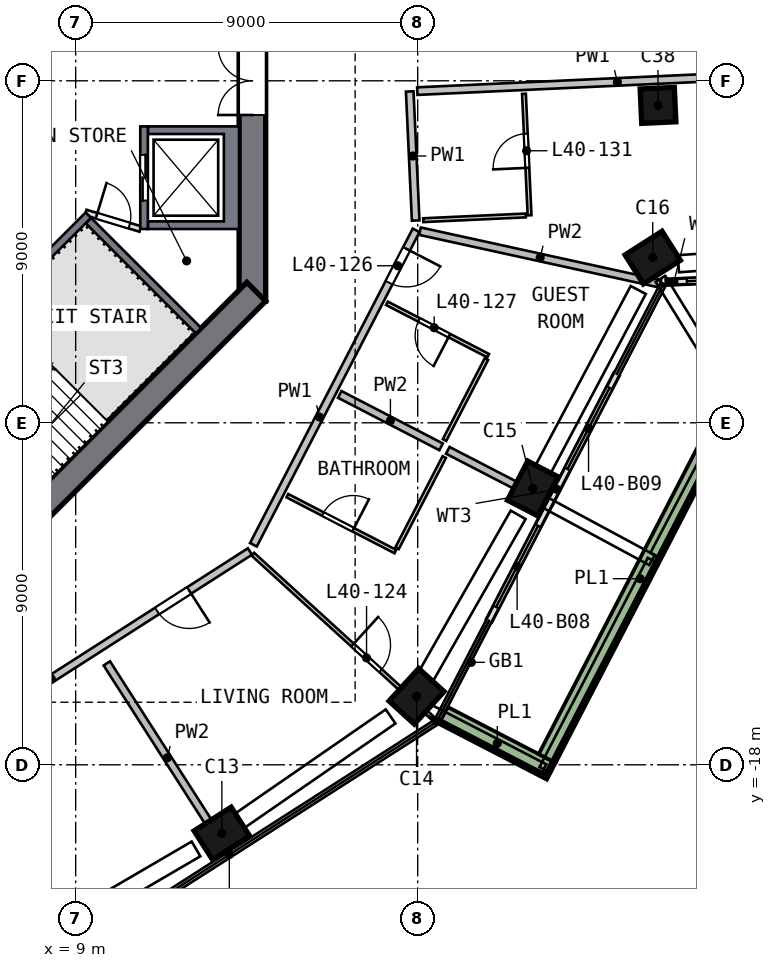
"""IFC4 building model, lengths in metres.
Left out: names, types, materials, properties, quantities, classifications, styles, units other than length and angle.
Written with IfcOpenShell. Run it as: python <this file> out.ifc"""

import sys

from ifc_helpers import new_model, si_unit, direction, frame, frame_2d, origin, origin_2d, place, context, subcontext, project, spatial, polyline, rectangle, outline, extrude, element, fill, save


model = new_model("IFC4")
c1 = context("Model", 3, precision=1e-05, world=origin(), true_north=direction((0.0, 1.0)))
c2 = subcontext(c1, "Body", "Model", "MODEL_VIEW")
j1 = project(units=[si_unit("LENGTHUNIT", "METRE"), si_unit("PLANEANGLEUNIT", "RADIAN")], contexts=[c1])
p1 = place(None, origin())
s1 = spatial("IfcSite", under=j1, at=p1, CompositionType="ELEMENT")
p2 = place(p1, origin())
s2 = spatial("IfcBuilding", under=s1, at=p2, CompositionType="ELEMENT")
p3 = place(p2, frame((0.0, 0.0, 165.5)))
s3 = spatial("IfcBuildingStorey", under=s2, at=p3, CompositionType="ELEMENT", Elevation=165.5)
p4 = place(p3, frame((12.733, -19.88, 0.0), z_axis=(0.094046929, 0.061296279, 0.993678993), x_axis=(0.837046934, 0.535491613, -0.112254901)))
e1 = element("IfcColumn", 1, at=p4, inside=s3, PredefinedType="COLUMN", context=c2, shape_type="SweptSolid", body=[
    extrude(rectangle(XDim=1.15, YDim=0.9, at=origin_2d()), origin(), (0.0, 0.0, 1.0), 3.019),
])
p5 = place(p3, frame((17.877, -16.301, 0.0), z_axis=(0.076717303, 0.08569056, 0.993363772), x_axis=(-0.668853924, -0.734443295, 0.115010764)))
e2 = element("IfcColumn", 2, at=p5, inside=s3, PredefinedType="COLUMN", context=c2, shape_type="SweptSolid", body=[
    extrude(rectangle(XDim=1.15, YDim=0.9, at=origin_2d()), origin(), (0.0, 0.0, 1.0), 3.02),
])
p6 = place(p3, frame((20.967, -10.85, 0.0), z_axis=(0.050783742, 0.100111899, 0.993679334), x_axis=(0.457036789, 0.882336041, -0.112251882)))
e3 = element("IfcColumn", 3, at=p6, inside=s3, PredefinedType="COLUMN", context=c2, shape_type="SweptSolid", body=[
    extrude(rectangle(XDim=1.15, YDim=0.9, at=origin_2d()), origin(), (0.0, 0.0, 1.0), 3.019),
])
p7 = place(p3, frame((24.158, -4.792, 0.0), z_axis=(0.021821591, 0.115007869, 0.99312487), x_axis=(-0.84308303, -0.531783602, 0.080107461)))
e4 = element("IfcColumn", 4, at=p7, inside=s3, PredefinedType="COLUMN", context=c2, shape_type="SweptSolid", body=[
    extrude(rectangle(XDim=1.15, YDim=0.9, at=origin_2d()), origin(), (0.0, 0.0, 1.0), 3.021),
])
p8 = place(p3, frame((24.32, -0.787, 0.0), z_axis=(0.002829176, 0.115672888, 0.993283333), x_axis=(0.998970509, 0.044645345, -0.008044552)))
e5 = element("IfcColumn", 5, at=p8, inside=s3, PredefinedType="COLUMN", context=c2, shape_type="SweptSolid", body=[
    extrude(rectangle(XDim=0.9, YDim=0.9, at=origin_2d()), origin(), (0.0, 0.0, 1.0), 3.02),
])
p9 = place(p3, frame((13.65, -5.799, 0.0), z_axis=(0.0, 0.0, 1.0), x_axis=(0.0, 1.0, 0.0)))
e6 = element("IfcWall", 6, at=p9, inside=s3, PredefinedType="SHEAR", context=c2, shape_type="SweptSolid", body=[
    extrude(rectangle(XDim=11.598, YDim=0.7, at=frame_2d((5.799, 0.0))), origin(), (0.0, 0.0, 1.0), 3.5),
])
p10 = place(p9, frame((4.899, 0.0, 0.0)))
e7 = element("IfcOpeningElement", 7, at=p10, cuts=e6, PredefinedType="OPENING", context=c2, shape_type="SweptSolid", body=[
    extrude(rectangle(XDim=1.8, YDim=2.1, at=frame_2d((0.9, 1.05))), frame((0.0, 0.36, 0.0), z_axis=(0.0, -1.0, 0.0), x_axis=(1.0, 0.0, 0.0)), (0.0, 0.0, 1.0), 0.72),
])
p11 = place(p3, frame((5.552, -13.752, 0.0), z_axis=(0.0, 0.0, 1.0), x_axis=(0.707106781, 0.707106781, 0.0)))
e8 = element("IfcWall", 8, at=p11, inside=s3, PredefinedType="SHEAR", context=c2, shape_type="SweptSolid", body=[
    extrude(rectangle(XDim=11.598, YDim=0.7, at=frame_2d((5.799, 0.0))), origin(), (0.0, 0.0, 1.0), 3.5),
])
p12 = place(p11, frame((2.099, 0.0, 0.0)))
e9 = element("IfcOpeningElement", 9, at=p12, cuts=e8, PredefinedType="OPENING", context=c2, shape_type="SweptSolid", body=[
    extrude(rectangle(XDim=1.2, YDim=2.1, at=frame_2d((0.6, 1.05))), frame((0.0, 0.36, 0.0), z_axis=(0.0, -1.0, 0.0), x_axis=(1.0, 0.0, 0.0)), (0.0, 0.0, 1.0), 0.72),
])
p13 = place(p3, frame((19.881, -14.2, 0.0), z_axis=(0.0, 0.0, 1.0), x_axis=(0.459564354, 0.888144473, 0.0)))
e10 = element("IfcWall", 10, at=p13, inside=s3, PredefinedType="SOLIDWALL", context=c2, shape_type="SweptSolid", body=[
    extrude(rectangle(XDim=3.475, YDim=0.15, at=frame_2d((1.737, 0.0))), origin(), (0.0, 0.0, 1.0), 2.935),
])
p14 = place(p13, frame((0.4, 0.0, 0.0)))
e11 = element("IfcOpeningElement", 11, at=p14, cuts=e10, PredefinedType="OPENING", context=c2, shape_type="SweptSolid", body=[
    extrude(rectangle(XDim=2.4, YDim=2.4, at=frame_2d((1.2, 1.2))), frame((0.0, 0.085, 0.0), z_axis=(0.0, -1.0, 0.0), x_axis=(1.0, 0.0, 0.0)), (0.0, 0.0, 1.0), 0.17),
])
p15 = place(p3, frame((21.478, -11.114, 0.0), z_axis=(0.0, 0.0, 1.0), x_axis=(0.459588339, 0.888132062, 0.0)))
e12 = element("IfcWall", 12, at=p15, inside=s3, PredefinedType="SOLIDWALL", context=c2, shape_type="SweptSolid", body=[
    extrude(rectangle(XDim=3.814, YDim=0.15, at=frame_2d((1.907, 0.0))), origin(), (0.0, 0.0, 1.0), 2.935),
])
p16 = place(p15, frame((1.014, 0.0, 0.0)))
e13 = element("IfcOpeningElement", 13, at=p16, cuts=e12, PredefinedType="OPENING", context=c2, shape_type="SweptSolid", body=[
    extrude(rectangle(XDim=2.4, YDim=2.4, at=frame_2d((1.2, 1.2))), frame((0.0, 0.085, 0.0), z_axis=(0.0, -1.0, 0.0), x_axis=(1.0, 0.0, 0.0)), (0.0, 0.0, 1.0), 0.17),
])
p17 = place(p3, frame((24.598, -5.298, 0.0), z_axis=(0.0, 0.0, 1.0), x_axis=(0.9989369, 0.04609849, 0.0)))
e14 = element("IfcWall", 14, at=p17, inside=s3, PredefinedType="SOLIDWALL", context=c2, shape_type="SweptSolid", body=[
    extrude(rectangle(XDim=2.388, YDim=0.15, at=frame_2d((1.194, 0.0))), origin(), (0.0, 0.0, 1.0), 2.935),
])
p18 = place(p17, frame((0.489, 0.0, 0.0)))
e15 = element("IfcOpeningElement", 15, at=p18, cuts=e14, PredefinedType="OPENING", context=c2, shape_type="SweptSolid", body=[
    extrude(rectangle(XDim=1.5, YDim=2.4, at=frame_2d((0.75, 1.2))), frame((0.0, 0.085, 0.0), z_axis=(0.0, -1.0, 0.0), x_axis=(1.0, 0.0, 0.0)), (0.0, 0.0, 1.0), 0.17),
])
p19 = place(p3, frame((18.673, -16.7, 0.0), z_axis=(0.0, 0.0, 1.0), x_axis=(0.888128492, -0.459595237, 0.0)))
e16 = element("IfcWall", 16, at=p19, inside=s3, PredefinedType="SOLIDWALL", context=c2, shape_type="SweptSolid", body=[
    extrude(rectangle(XDim=3.199, YDim=0.5, at=frame_2d((1.6, 0.0))), origin(), (0.0, 0.0, 1.0), 0.7),
])
p20 = place(p3, frame((21.407, -17.833, 0.0), z_axis=(0.0, 0.0, 1.0), x_axis=(0.459583147, 0.888134748, 0.0)))
e17 = element("IfcWall", 17, at=p20, inside=s3, PredefinedType="SOLIDWALL", context=c2, shape_type="SweptSolid", body=[
    extrude(rectangle(XDim=10.653, YDim=0.5, at=frame_2d((5.326, 0.0))), origin(), (0.0, 0.0, 1.0), 0.7),
])
p21 = place(p3, origin())
e18 = element("IfcWall", 18, at=p21, inside=s3, PredefinedType="SOLIDWALL", context=c2, shape_type="SweptSolid", body=[
    extrude(outline(polyline([(13.3, -3.9), (10.9, -3.9), (10.9, -3.7), (12.9, -3.7), (12.9, -1.4), (10.9, -1.4), (10.9, -1.2), (13.3, -1.2), (13.3, -3.9)])), origin(), (0.0, 0.0, 1.0), 3.0),
])
p22 = place(p3, frame((10.8, -1.2, 0.0), z_axis=(0.0, 0.0, 1.0), x_axis=(0.0, -1.0, 0.0)))
e19 = element("IfcWall", 19, at=p22, inside=s3, PredefinedType="SOLIDWALL", context=c2, shape_type="SweptSolid", body=[
    extrude(rectangle(XDim=2.7, YDim=0.2, at=frame_2d((1.35, 0.0))), origin(), (0.0, 0.0, 1.0), 3.0),
])
p23 = place(p22, frame((0.75, 0.0, 0.0)))
e20 = element("IfcOpeningElement", 20, at=p23, cuts=e19, PredefinedType="OPENING", context=c2, shape_type="SweptSolid", body=[
    extrude(rectangle(XDim=1.2, YDim=2.1, at=frame_2d((0.6, 1.05))), frame((0.0, 0.11, 0.0), z_axis=(0.0, -1.0, 0.0), x_axis=(1.0, 0.0, 0.0)), (0.0, 0.0, 1.0), 0.22),
])
p24 = place(p3, frame((9.334, -3.535, 0.0), z_axis=(0.0, 0.0, 1.0), x_axis=(-0.707106781, -0.707106781, 0.0)))
e21 = element("IfcWall", 21, at=p24, inside=s3, PredefinedType="SOLIDWALL", context=c2, shape_type="SweptSolid", body=[
    extrude(rectangle(XDim=8.2, YDim=0.2, at=frame_2d((4.1, 0.0))), origin(), (0.0, 0.0, 1.0), 3.0),
])
p25 = place(p24, frame((6.6, 0.0, 0.0)))
e22 = element("IfcOpeningElement", 22, at=p25, cuts=e21, PredefinedType="OPENING", context=c2, shape_type="SweptSolid", body=[
    extrude(rectangle(XDim=1.2, YDim=2.1, at=frame_2d((0.6, 1.05))), frame((0.0, 0.11, 0.0), z_axis=(0.0, -1.0, 0.0), x_axis=(1.0, 0.0, 0.0)), (0.0, 0.0, 1.0), 0.22),
])
p26 = place(p3, frame((9.334, -3.677, 0.0), z_axis=(0.0, 0.0, 1.0), x_axis=(0.707106781, -0.707106781, 0.0)))
e23 = element("IfcWall", 23, at=p26, inside=s3, PredefinedType="SOLIDWALL", context=c2, shape_type="SweptSolid", body=[
    extrude(rectangle(XDim=4.1, YDim=0.2, at=frame_2d((2.05, 0.0))), origin(), (0.0, 0.0, 1.0), 3.0),
])
p27 = place(p3, frame((9.263, -3.465, 0.0), z_axis=(0.0, 0.0, 1.0), x_axis=(0.957084567, -0.289808785, 0.0)))
e24 = element("IfcWall", 24, at=p27, inside=s3, PredefinedType="PARTITIONING", context=c2, shape_type="SweptSolid", body=[
    extrude(rectangle(XDim=1.501, YDim=0.15, at=frame_2d((0.75, 0.0))), origin(), (0.0, 0.0, 1.0), 3.0),
])
p28 = place(p27, frame((0.301, 0.0, 0.0)))
e25 = element("IfcOpeningElement", 25, at=p28, cuts=e24, PredefinedType="OPENING", context=c2, shape_type="SweptSolid", body=[
    extrude(rectangle(XDim=0.9, YDim=2.1, at=frame_2d((0.45, 1.05))), frame((0.0, 0.085, 0.0), z_axis=(0.0, -1.0, 0.0), x_axis=(1.0, 0.0, 0.0)), (0.0, 0.0, 1.0), 0.17),
])
p29 = place(p3, frame((13.585, -12.387, 0.0), z_axis=(0.0, 0.0, 1.0), x_axis=(-0.842082403, -0.539348892, 0.0)))
e26 = element("IfcWall", 26, at=p29, inside=s3, PredefinedType="SOLIDWALL", context=c2, shape_type="SweptSolid", body=[
    extrude(rectangle(XDim=9.316, YDim=0.2, at=frame_2d((4.658, 0.0))), origin(), (0.0, 0.0, 1.0), 3.0),
])
p30 = place(p29, frame((1.9, 0.0, 0.0)))
e27 = element("IfcOpeningElement", 27, at=p30, cuts=e26, PredefinedType="OPENING", context=c2, shape_type="SweptSolid", body=[
    extrude(rectangle(XDim=1.0, YDim=2.1, at=frame_2d((0.5, 1.05))), frame((0.0, 0.11, 0.0), z_axis=(0.0, -1.0, 0.0), x_axis=(1.0, 0.0, 0.0)), (0.0, 0.0, 1.0), 0.22),
])
p31 = place(p3, frame((17.959, -3.935, 0.0), z_axis=(0.0, 0.0, 1.0), x_axis=(-0.459581173, -0.88813577, 0.0)))
e28 = element("IfcWall", 28, at=p31, inside=s3, PredefinedType="SOLIDWALL", context=c2, shape_type="SweptSolid", body=[
    extrude(rectangle(XDim=9.317, YDim=0.2, at=frame_2d((4.658, 0.0))), origin(), (0.0, 0.0, 1.0), 3.0),
])
p32 = place(p31, frame((0.55, 0.0, 0.0)))
e29 = element("IfcOpeningElement", 29, at=p32, cuts=e28, PredefinedType="OPENING", context=c2, shape_type="SweptSolid", body=[
    extrude(rectangle(XDim=1.0, YDim=2.1, at=frame_2d((0.5, 1.05))), frame((0.0, 0.11, 0.0), z_axis=(0.0, -1.0, 0.0), x_axis=(1.0, 0.0, 0.0)), (0.0, 0.0, 1.0), 0.22),
])
p33 = place(p3, frame((17.947, -3.677, 0.0), z_axis=(0.0, 0.0, 1.0), x_axis=(-0.046101459, 0.998936762, 0.0)))
e30 = element("IfcWall", 30, at=p33, inside=s3, PredefinedType="SOLIDWALL", context=c2, shape_type="SweptSolid", body=[
    extrude(rectangle(XDim=3.4, YDim=0.2, at=frame_2d((1.7, 0.0))), origin(), (0.0, 0.0, 1.0), 3.0),
])
p34 = place(p3, frame((17.99, -0.272, 0.0), z_axis=(0.0, 0.0, 1.0), x_axis=(0.998938234, 0.046069564, 0.0)))
e31 = element("IfcWall", 31, at=p34, inside=s3, PredefinedType="SOLIDWALL", context=c2, shape_type="SweptSolid", body=[
    extrude(rectangle(XDim=10.541, YDim=0.2, at=frame_2d((5.27, 0.0))), origin(), (0.0, 0.0, 1.0), 3.0),
])
p35 = place(p3, frame((9.819, -15.331, 0.0), z_axis=(0.0, 0.0, 1.0), x_axis=(0.539354132, -0.842079047, 0.0)))
e32 = element("IfcWall", 32, at=p35, inside=s3, PredefinedType="SOLIDWALL", context=c2, shape_type="SweptSolid", body=[
    extrude(rectangle(XDim=5.903, YDim=0.2, at=frame_2d((2.951, 0.0))), origin(), (0.0, 0.0, 1.0), 3.0),
])
p36 = place(p3, frame((15.949, -8.253, 0.0), z_axis=(0.0, 0.0, 1.0), x_axis=(0.888160413, -0.459533547, 0.0)))
e33 = element("IfcWall", 33, at=p36, inside=s3, PredefinedType="SOLIDWALL", context=c2, shape_type="SweptSolid", body=[
    extrude(rectangle(XDim=3.002, YDim=0.2, at=frame_2d((1.501, 0.0))), origin(), (0.0, 0.0, 1.0), 3.0),
])
p37 = place(p3, frame((18.792, -9.724, 0.0), z_axis=(0.0, 0.0, 1.0), x_axis=(0.888151257, -0.459551242, 0.0)))
e34 = element("IfcWall", 34, at=p37, inside=s3, PredefinedType="SOLIDWALL", context=c2, shape_type="SweptSolid", body=[
    extrude(rectangle(XDim=2.95, YDim=0.2, at=frame_2d((1.475, 0.0))), origin(), (0.0, 0.0, 1.0), 3.0),
])
p38 = place(p3, frame((18.06, -3.958, 0.0), z_axis=(0.0, 0.0, 1.0), x_axis=(0.976827652, -0.214027425, 0.0)))
e35 = element("IfcWall", 35, at=p38, inside=s3, PredefinedType="SOLIDWALL", context=c2, shape_type="SweptSolid", body=[
    extrude(rectangle(XDim=6.476, YDim=0.2, at=frame_2d((3.238, 0.0))), origin(), (0.0, 0.0, 1.0), 3.0),
])
p39 = place(p3, frame((14.571, -10.918, 0.0), z_axis=(0.0, 0.0, 1.0), x_axis=(0.888114553, -0.459622171, 0.0)))
e36 = element("IfcWall", 36, at=p39, inside=s3, PredefinedType="PARTITIONING", context=c2, shape_type="SweptSolid", body=[
    extrude(rectangle(XDim=3.2, YDim=0.1, at=frame_2d((1.6, 0.0))), origin(), (0.0, 0.0, 1.0), 3.0),
])
p40 = place(p39, frame((1.05, 0.0, 0.0)))
e37 = element("IfcOpeningElement", 37, at=p40, cuts=e36, PredefinedType="OPENING", context=c2, shape_type="SweptSolid", body=[
    extrude(rectangle(XDim=0.9, YDim=2.1, at=frame_2d((0.45, 1.05))), frame((0.0, 0.06, 0.0), z_axis=(0.0, -1.0, 0.0), x_axis=(1.0, 0.0, 0.0)), (0.0, 0.0, 1.0), 0.12),
])
p41 = place(p3, frame((13.662, -12.457, 0.0), z_axis=(0.0, 0.0, 1.0), x_axis=(0.738912228, -0.673801691, 0.0)))
e38 = element("IfcWall", 38, at=p41, inside=s3, PredefinedType="PARTITIONING", context=c2, shape_type="SweptSolid", body=[
    extrude(rectangle(XDim=6.476, YDim=0.1, at=frame_2d((3.238, 0.0))), origin(), (0.0, 0.0, 1.0), 3.0),
])
p42 = place(p41, frame((3.55, 0.0, 0.0)))
e39 = element("IfcOpeningElement", 39, at=p42, cuts=e38, PredefinedType="OPENING", context=c2, shape_type="SweptSolid", body=[
    extrude(rectangle(XDim=1.0, YDim=2.1, at=frame_2d((0.5, 1.05))), frame((0.0, 0.06, 0.0), z_axis=(0.0, -1.0, 0.0), x_axis=(1.0, 0.0, 0.0)), (0.0, 0.0, 1.0), 0.12),
])
p43 = place(p3, frame((17.459, -12.3, 0.0), z_axis=(0.0, 0.0, 1.0), x_axis=(0.459612319, 0.888119652, 0.0)))
e40 = element("IfcWall", 40, at=p43, inside=s3, PredefinedType="PARTITIONING", context=c2, shape_type="SweptSolid", body=[
    extrude(rectangle(XDim=2.7, YDim=0.1, at=frame_2d((1.35, 0.0))), origin(), (0.0, 0.0, 1.0), 3.0),
])
p44 = place(p3, frame((19.855, -7.234, 0.0), z_axis=(0.0, 0.0, 1.0), x_axis=(-0.888123731, 0.459604438, 0.0)))
e41 = element("IfcWall", 41, at=p44, inside=s3, PredefinedType="PARTITIONING", context=c2, shape_type="SweptSolid", body=[
    extrude(rectangle(XDim=3.0, YDim=0.1, at=frame_2d((1.5, 0.0))), origin(), (0.0, 0.0, 1.0), 3.0),
])
p45 = place(p44, frame((1.15, 0.0, 0.0)))
e42 = element("IfcOpeningElement", 42, at=p45, cuts=e41, PredefinedType="OPENING", context=c2, shape_type="SweptSolid", body=[
    extrude(rectangle(XDim=0.9, YDim=2.1, at=frame_2d((0.45, 1.05))), frame((0.0, 0.06, 0.0), z_axis=(0.0, -1.0, 0.0), x_axis=(1.0, 0.0, 0.0)), (0.0, 0.0, 1.0), 0.12),
])
p46 = place(p3, frame((19.809, -7.323, 0.0), z_axis=(0.0, 0.0, 1.0), x_axis=(-0.459622171, -0.888114553, 0.0)))
e43 = element("IfcWall", 43, at=p46, inside=s3, PredefinedType="PARTITIONING", context=c2, shape_type="SweptSolid", body=[
    extrude(rectangle(XDim=2.4, YDim=0.1, at=frame_2d((1.2, 0.0))), origin(), (0.0, 0.0, 1.0), 3.0),
])
p47 = place(p3, frame((18.146, -3.668, 0.0), z_axis=(0.0, 0.0, 1.0), x_axis=(0.998936225, 0.046113095, 0.0)))
e44 = element("IfcWall", 44, at=p47, inside=s3, PredefinedType="PARTITIONING", context=c2, shape_type="SweptSolid", body=[
    extrude(rectangle(XDim=2.7, YDim=0.1, at=frame_2d((1.35, 0.0))), origin(), (0.0, 0.0, 1.0), 3.0),
])
p48 = place(p3, frame((20.944, -3.539, 0.0), z_axis=(0.0, 0.0, 1.0), x_axis=(-0.046082512, 0.998937637, 0.0)))
e45 = element("IfcWall", 45, at=p48, inside=s3, PredefinedType="PARTITIONING", context=c2, shape_type="SweptSolid", body=[
    extrude(rectangle(XDim=3.2, YDim=0.1, at=frame_2d((1.6, 0.0))), origin(), (0.0, 0.0, 1.0), 3.0),
])
p49 = place(p48, frame((1.25, 0.0, 0.0)))
e46 = element("IfcOpeningElement", 46, at=p49, cuts=e45, PredefinedType="OPENING", context=c2, shape_type="SweptSolid", body=[
    extrude(rectangle(XDim=0.9, YDim=2.1, at=frame_2d((0.45, 1.05))), frame((0.0, 0.06, 0.0), z_axis=(0.0, -1.0, 0.0), x_axis=(1.0, 0.0, 0.0)), (0.0, 0.0, 1.0), 0.12),
])
p50 = place(p14, origin())
e47 = element("IfcDoor", 47, at=p50, inside=s3, OperationType="SLIDING_TO_RIGHT", PredefinedType="DOOR", context=c2, shape_type="SweptSolid", body=[
    extrude(rectangle(XDim=2.4, YDim=2.4, at=frame_2d((1.2, 1.2))), frame((0.0, 0.025, 0.0), z_axis=(0.0, -1.0, 0.0), x_axis=(1.0, 0.0, 0.0)), (0.0, 0.0, 1.0), 0.05),
])
fill(e11, e47)
p51 = place(p16, origin())
e48 = element("IfcDoor", 48, at=p51, inside=s3, OperationType="SLIDING_TO_LEFT", PredefinedType="DOOR", context=c2, shape_type="SweptSolid", body=[
    extrude(rectangle(XDim=2.4, YDim=2.4, at=frame_2d((1.2, 1.2))), frame((0.0, 0.025, 0.0), z_axis=(0.0, -1.0, 0.0), x_axis=(1.0, 0.0, 0.0)), (0.0, 0.0, 1.0), 0.05),
])
fill(e13, e48)
p52 = place(p18, origin())
e49 = element("IfcDoor", 49, at=p52, inside=s3, OperationType="SLIDING_TO_LEFT", PredefinedType="DOOR", context=c2, shape_type="SweptSolid", body=[
    extrude(rectangle(XDim=1.5, YDim=2.4, at=frame_2d((0.75, 1.2))), frame((0.0, 0.025, 0.0), z_axis=(0.0, -1.0, 0.0), x_axis=(1.0, 0.0, 0.0)), (0.0, 0.0, 1.0), 0.05),
])
fill(e15, e49)
p53 = place(p23, origin())
e50 = element("IfcDoor", 50, at=p53, inside=s3, OperationType="DOUBLE_DOOR_SLIDING", PredefinedType="DOOR", context=c2, shape_type="SweptSolid", body=[
    extrude(rectangle(XDim=1.2, YDim=2.1, at=frame_2d((0.6, 1.05))), frame((0.0, 0.025, 0.0), z_axis=(0.0, -1.0, 0.0), x_axis=(1.0, 0.0, 0.0)), (0.0, 0.0, 1.0), 0.05),
])
fill(e20, e50)
p54 = place(p10, origin())
e51 = element("IfcDoor", 51, at=p54, inside=s3, OperationType="DOUBLE_DOOR_SINGLE_SWING", PredefinedType="DOOR", context=c2, shape_type="SweptSolid", body=[
    extrude(rectangle(XDim=1.8, YDim=2.1, at=frame_2d((0.9, 1.05))), frame((0.0, 0.025, 0.0), z_axis=(0.0, -1.0, 0.0), x_axis=(1.0, 0.0, 0.0)), (0.0, 0.0, 1.0), 0.05),
])
fill(e7, e51)
p55 = place(p28, origin())
e52 = element("IfcDoor", 52, at=p55, inside=s3, OperationType="SINGLE_SWING_LEFT", PredefinedType="DOOR", context=c2, shape_type="SweptSolid", body=[
    extrude(rectangle(XDim=0.9, YDim=2.1, at=frame_2d((0.45, 1.05))), frame((0.0, 0.025, 0.0), z_axis=(0.0, -1.0, 0.0), x_axis=(1.0, 0.0, 0.0)), (0.0, 0.0, 1.0), 0.05),
])
fill(e25, e52)
p56 = place(p30, origin())
e53 = element("IfcDoor", 53, at=p56, inside=s3, OperationType="SINGLE_SWING_LEFT", PredefinedType="DOOR", context=c2, shape_type="SweptSolid", body=[
    extrude(rectangle(XDim=1.0, YDim=2.1, at=frame_2d((0.5, 1.05))), frame((0.0, 0.025, 0.0), z_axis=(0.0, -1.0, 0.0), x_axis=(1.0, 0.0, 0.0)), (0.0, 0.0, 1.0), 0.05),
])
fill(e27, e53)
p57 = place(p42, origin())
e54 = element("IfcDoor", 54, at=p57, inside=s3, OperationType="SINGLE_SWING_LEFT", PredefinedType="DOOR", context=c2, shape_type="SweptSolid", body=[
    extrude(rectangle(XDim=1.0, YDim=2.1, at=frame_2d((0.5, 1.05))), frame((0.0, 0.025, 0.0), z_axis=(0.0, -1.0, 0.0), x_axis=(1.0, 0.0, 0.0)), (0.0, 0.0, 1.0), 0.05),
])
fill(e39, e54)
p58 = place(p40, origin())
e55 = element("IfcDoor", 55, at=p58, inside=s3, OperationType="SINGLE_SWING_RIGHT", PredefinedType="DOOR", context=c2, shape_type="SweptSolid", body=[
    extrude(rectangle(XDim=0.9, YDim=2.1, at=frame_2d((0.45, 1.05))), frame((0.0, 0.025, 0.0), z_axis=(0.0, -1.0, 0.0), x_axis=(1.0, 0.0, 0.0)), (0.0, 0.0, 1.0), 0.05),
])
fill(e37, e55)
p59 = place(p32, origin())
e56 = element("IfcDoor", 56, at=p59, inside=s3, OperationType="SINGLE_SWING_LEFT", PredefinedType="DOOR", context=c2, shape_type="SweptSolid", body=[
    extrude(rectangle(XDim=1.0, YDim=2.1, at=frame_2d((0.5, 1.05))), frame((0.0, 0.025, 0.0), z_axis=(0.0, -1.0, 0.0), x_axis=(1.0, 0.0, 0.0)), (0.0, 0.0, 1.0), 0.05),
])
fill(e29, e56)
p60 = place(p45, origin())
e57 = element("IfcDoor", 57, at=p60, inside=s3, OperationType="SINGLE_SWING_LEFT", PredefinedType="DOOR", context=c2, shape_type="SweptSolid", body=[
    extrude(rectangle(XDim=0.9, YDim=2.1, at=frame_2d((0.45, 1.05))), frame((0.0, 0.025, 0.0), z_axis=(0.0, -1.0, 0.0), x_axis=(1.0, 0.0, 0.0)), (0.0, 0.0, 1.0), 0.05),
])
fill(e42, e57)
p61 = place(p49, origin())
e58 = element("IfcDoor", 58, at=p61, inside=s3, OperationType="SINGLE_SWING_LEFT", PredefinedType="DOOR", context=c2, shape_type="SweptSolid", body=[
    extrude(rectangle(XDim=0.9, YDim=2.1, at=frame_2d((0.45, 1.05))), frame((0.0, 0.025, 0.0), z_axis=(0.0, -1.0, 0.0), x_axis=(1.0, 0.0, 0.0)), (0.0, 0.0, 1.0), 0.05),
])
fill(e46, e58)
save(model, sys.argv[1])
